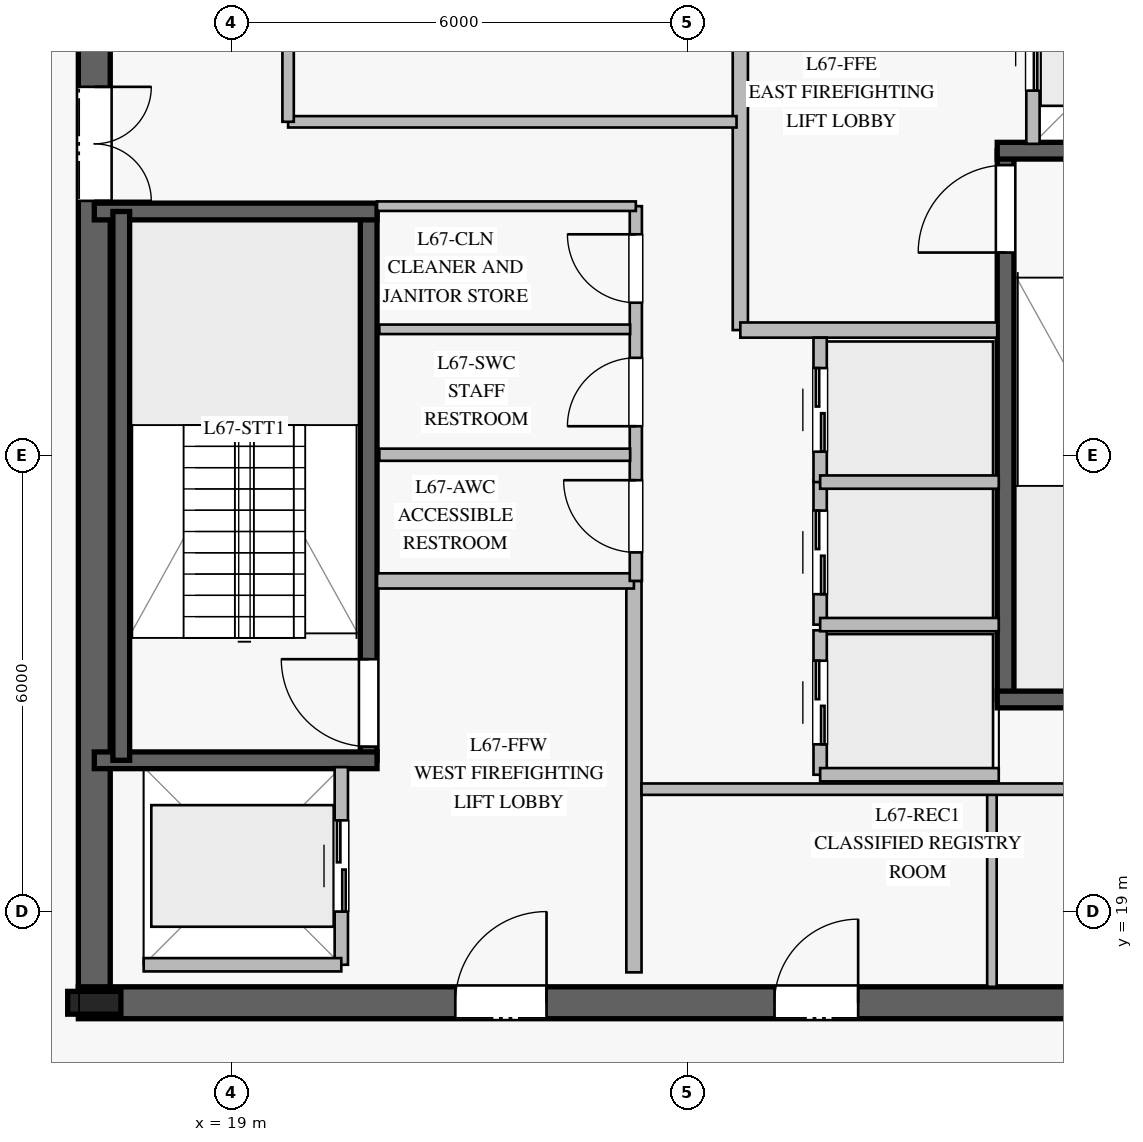
"""IFC4 building model, lengths in metres.
Left out: names, types, materials, properties, quantities, classifications, styles, units other than length and angle.
Written with IfcOpenShell. Run it as: python <this file> out.ifc"""

import sys

from ifc_helpers import new_model, si_unit, direction, frame, frame_2d, origin, origin_2d, place, context, subcontext, project, spatial, rectangle, i_section, extrude, element, fill, save


model = new_model("IFC4")
c1 = context("Model", 3, precision=1e-05, world=origin(), true_north=direction((0.0, 1.0)))
c2 = subcontext(c1, "Body", "Model", "MODEL_VIEW")
j1 = project(units=[si_unit("LENGTHUNIT", "METRE"), si_unit("PLANEANGLEUNIT", "RADIAN")], contexts=[c1])
p1 = place(None, origin())
s1 = spatial("IfcSite", under=j1, at=p1, CompositionType="ELEMENT")
p2 = place(p1, origin())
s2 = spatial("IfcBuilding", under=s1, at=p2, CompositionType="ELEMENT")
p3 = place(p2, frame((0.0, 0.0, 278.2)))
s3 = spatial("IfcBuildingStorey", under=s2, at=p3, CompositionType="ELEMENT", Elevation=278.2)
p4 = place(p3, frame((16.99, 17.8, 0.0), z_axis=(0.0, 0.0, 1.0), x_axis=(1.0, 0.0, 0.0)))
e1 = element("IfcWall", 1, at=p4, inside=s3, PredefinedType="SHEAR", context=c2, shape_type="SweptSolid", body=[
    extrude(rectangle(XDim=16.02, YDim=0.42, at=frame_2d((8.01, 0.0))), origin(), (0.0, 0.0, 1.0), 3.78),
])
p5 = place(p4, frame((4.96, 0.0, 0.0)))
e2 = element("IfcOpeningElement", 2, at=p5, cuts=e1, PredefinedType="OPENING", context=c2, shape_type="SweptSolid", body=[
    extrude(rectangle(XDim=1.2, YDim=2.25, at=frame_2d((0.6, 1.125))), frame((0.0, 0.22, 0.0), z_axis=(0.0, -1.0, 0.0), x_axis=(1.0, 0.0, 0.0)), (0.0, 0.0, 1.0), 0.44),
])
p6 = place(p4, frame((13.91, 0.0, 0.0)))
e3 = element("IfcOpeningElement", 3, at=p6, cuts=e1, PredefinedType="OPENING", context=c2, shape_type="SweptSolid", body=[
    extrude(rectangle(XDim=0.9, YDim=2.1, at=frame_2d((0.45, 1.05))), frame((0.0, 0.22, 0.0), z_axis=(0.0, -1.0, 0.0), x_axis=(1.0, 0.0, 0.0)), (0.0, 0.0, 1.0), 0.44),
])
p7 = place(p4, frame((9.16, 0.0, 0.0)))
e4 = element("IfcOpeningElement", 4, at=p7, cuts=e1, PredefinedType="OPENING", context=c2, shape_type="SweptSolid", body=[
    extrude(rectangle(XDim=1.1, YDim=2.2, at=frame_2d((0.55, 1.1))), frame((0.0, 0.22, 0.0), z_axis=(0.0, -1.0, 0.0), x_axis=(1.0, 0.0, 0.0)), (0.0, 0.0, 1.0), 0.44),
])
p8 = place(p3, frame((17.2, 31.99, 0.0), z_axis=(0.0, 0.0, 1.0), x_axis=(0.0, -1.0, 0.0)))
e5 = element("IfcWall", 5, at=p8, inside=s3, PredefinedType="SHEAR", context=c2, shape_type="SweptSolid", body=[
    extrude(rectangle(XDim=13.98, YDim=0.42, at=frame_2d((6.99, 0.0))), origin(), (0.0, 0.0, 1.0), 3.78),
])
p9 = place(p8, frame((2.14, 0.0, 0.0)))
e6 = element("IfcOpeningElement", 6, at=p9, cuts=e5, PredefinedType="OPENING", context=c2, shape_type="SweptSolid", body=[
    extrude(rectangle(XDim=1.5, YDim=2.2, at=frame_2d((0.75, 1.1))), frame((0.0, 0.22, 0.0), z_axis=(0.0, -1.0, 0.0), x_axis=(1.0, 0.0, 0.0)), (0.0, 0.0, 1.0), 0.44),
])
p10 = place(p3, frame((17.2, 17.8, 0.0), z_axis=(0.0, 0.0, 1.0), x_axis=(1.0, 0.0, 0.0)))
e7 = element("IfcColumn", 7, at=p10, inside=s3, PredefinedType="COLUMN", context=c2, shape_type="SweptSolid", body=[
    extrude(i_section(OverallWidth=0.3, OverallDepth=0.7, WebThickness=0.017, FlangeThickness=0.032, at=origin_2d()), origin(), (0.0, 0.0, 1.0), 4.0),
])
p11 = place(p3, frame((20.81, 20.99, 0.0), z_axis=(0.0, 0.0, 1.0), x_axis=(0.0, 1.0, 0.0)))
e8 = element("IfcWall", 8, at=p11, inside=s3, PredefinedType="SOLIDWALL", context=c2, shape_type="SweptSolid", body=[
    extrude(rectangle(XDim=7.22, YDim=0.22, at=frame_2d((3.61, 0.0))), origin(), (0.0, 0.0, 1.0), 3.78),
])
p12 = place(p11, frame((0.18, 0.0, 0.0)))
e9 = element("IfcOpeningElement", 9, at=p12, cuts=e8, PredefinedType="OPENING", context=c2, shape_type="SweptSolid", body=[
    extrude(rectangle(XDim=1.15, YDim=2.2, at=frame_2d((0.575, 1.1))), frame((0.0, 0.12, 0.0), z_axis=(0.0, -1.0, 0.0), x_axis=(1.0, 0.0, 0.0)), (0.0, 0.0, 1.0), 0.24),
])
for number, where, z_axis, x_axis in (
    (10, (17.2, 20.99, 0.0), (0.0, 0.0, 1.0), (1.0, 0.0, 0.0)),
    (11, (17.2, 28.21, 0.0), (0.0, 0.0, 1.0), (1.0, 0.0, 0.0)),
):
    element("IfcWall", number, at=place(p3, frame(where, z_axis=z_axis, x_axis=x_axis)), inside=s3, PredefinedType="SOLIDWALL", context=c2, shape_type="SweptSolid", body=[
        extrude(rectangle(XDim=3.72, YDim=0.22, at=frame_2d((1.86, 0.0))), origin(), (0.0, 0.0, 1.0), 3.78),
    ])
p13 = place(p3, frame((17.555, 28.21, 0.0), z_axis=(0.0, 0.0, 1.0), x_axis=(0.0, -1.0, 0.0)))
e12 = element("IfcWall", 12, at=p13, inside=s3, PredefinedType="SOLIDWALL", context=c2, shape_type="SweptSolid", body=[
    extrude(rectangle(XDim=7.22, YDim=0.22, at=frame_2d((3.61, 0.0))), origin(), (0.0, 0.0, 1.0), 3.78),
])
p14 = place(p3, frame((29.19, 21.79, 0.0), z_axis=(0.0, 0.0, 1.0), x_axis=(0.0, 1.0, 0.0)))
e13 = element("IfcWall", 13, at=p14, inside=s3, PredefinedType="SOLIDWALL", context=c2, shape_type="SweptSolid", body=[
    extrude(rectangle(XDim=7.22, YDim=0.22, at=frame_2d((3.61, 0.0))), origin(), (0.0, 0.0, 1.0), 3.78),
])
p15 = place(p14, frame((5.88, 0.0, 0.0)))
e14 = element("IfcOpeningElement", 14, at=p15, cuts=e13, PredefinedType="OPENING", context=c2, shape_type="SweptSolid", body=[
    extrude(rectangle(XDim=1.15, YDim=2.2, at=frame_2d((0.575, 1.1))), frame((0.0, 0.12, 0.0), z_axis=(0.0, -1.0, 0.0), x_axis=(1.0, 0.0, 0.0)), (0.0, 0.0, 1.0), 0.24),
])
for number, where, z_axis, x_axis in (
    (15, (29.08, 21.79, 0.0), (0.0, 0.0, 1.0), (1.0, 0.0, 0.0)),
    (16, (29.08, 29.01, 0.0), (0.0, 0.0, 1.0), (1.0, 0.0, 0.0)),
):
    element("IfcWall", number, at=place(p3, frame(where, z_axis=z_axis, x_axis=x_axis)), inside=s3, PredefinedType="SOLIDWALL", context=c2, shape_type="SweptSolid", body=[
        extrude(rectangle(XDim=3.72, YDim=0.22, at=frame_2d((1.86, 0.0))), origin(), (0.0, 0.0, 1.0), 3.78),
    ])
p16 = place(p3, frame((24.3, 18.2, 0.0), z_axis=(0.0, 0.0, 1.0), x_axis=(0.0, 1.0, 0.0)))
e17 = element("IfcWall", 17, at=p16, inside=s3, PredefinedType="PARTITIONING", context=c2, shape_type="SweptSolid", body=[
    extrude(rectangle(XDim=5.15, YDim=0.2, at=frame_2d((2.575, 0.0))), origin(), (0.0, 0.0, 1.0), 3.78),
])
p17 = place(p3, frame((20.92, 23.35, 0.0), z_axis=(0.0, 0.0, 1.0), x_axis=(1.0, 0.0, 0.0)))
e18 = element("IfcWall", 18, at=p17, inside=s3, PredefinedType="PARTITIONING", context=c2, shape_type="SweptSolid", body=[
    extrude(rectangle(XDim=3.38, YDim=0.2, at=frame_2d((1.69, 0.0))), origin(), (0.0, 0.0, 1.0), 3.78),
])
p18 = place(p3, frame((25.7, 26.65, 0.0), z_axis=(0.0, 0.0, 1.0), x_axis=(0.0, 1.0, 0.0)))
e19 = element("IfcWall", 19, at=p18, inside=s3, PredefinedType="PARTITIONING", context=c2, shape_type="SweptSolid", body=[
    extrude(rectangle(XDim=5.15, YDim=0.2, at=frame_2d((2.575, 0.0))), origin(), (0.0, 0.0, 1.0), 3.78),
])
p19 = place(p3, frame((25.7, 26.65, 0.0), z_axis=(0.0, 0.0, 1.0), x_axis=(1.0, 0.0, 0.0)))
e20 = element("IfcWall", 20, at=p19, inside=s3, PredefinedType="PARTITIONING", context=c2, shape_type="SweptSolid", body=[
    extrude(rectangle(XDim=3.38, YDim=0.2, at=frame_2d((1.69, 0.0))), origin(), (0.0, 0.0, 1.0), 3.78),
])
p20 = place(p3, frame((24.325, 23.35, 0.0), z_axis=(0.0, 0.0, 1.0), x_axis=(0.0, 1.0, 0.0)))
e21 = element("IfcWall", 21, at=p20, inside=s3, PredefinedType="PLUMBINGWALL", context=c2, shape_type="SweptSolid", body=[
    extrude(rectangle(XDim=4.93, YDim=0.16, at=frame_2d((2.465, 0.0))), origin(), (0.0, 0.0, 1.0), 3.78),
])
p21 = place(p20, frame((0.375, 0.0, 0.0)))
e22 = element("IfcOpeningElement", 22, at=p21, cuts=e21, PredefinedType="OPENING", context=c2, shape_type="SweptSolid", body=[
    extrude(rectangle(XDim=0.95, YDim=2.1, at=frame_2d((0.475, 1.05))), frame((0.0, 0.09, 0.0), z_axis=(0.0, -1.0, 0.0), x_axis=(1.0, 0.0, 0.0)), (0.0, 0.0, 1.0), 0.18),
])
p22 = place(p20, frame((2.035, 0.0, 0.0)))
e23 = element("IfcOpeningElement", 23, at=p22, cuts=e21, PredefinedType="OPENING", context=c2, shape_type="SweptSolid", body=[
    extrude(rectangle(XDim=0.9, YDim=2.1, at=frame_2d((0.45, 1.05))), frame((0.0, 0.09, 0.0), z_axis=(0.0, -1.0, 0.0), x_axis=(1.0, 0.0, 0.0)), (0.0, 0.0, 1.0), 0.18),
])
p23 = place(p20, frame((3.66, 0.0, 0.0)))
e24 = element("IfcOpeningElement", 24, at=p23, cuts=e21, PredefinedType="OPENING", context=c2, shape_type="SweptSolid", body=[
    extrude(rectangle(XDim=0.9, YDim=2.1, at=frame_2d((0.45, 1.05))), frame((0.0, 0.09, 0.0), z_axis=(0.0, -1.0, 0.0), x_axis=(1.0, 0.0, 0.0)), (0.0, 0.0, 1.0), 0.18),
])
p24 = place(p3, frame((20.92, 28.28, 0.0), z_axis=(0.0, 0.0, 1.0), x_axis=(1.0, 0.0, 0.0)))
e25 = element("IfcWall", 25, at=p24, inside=s3, PredefinedType="PARTITIONING", context=c2, shape_type="SweptSolid", body=[
    extrude(rectangle(XDim=3.405, YDim=0.125, at=frame_2d((1.703, 0.0))), origin(), (0.0, 0.0, 1.0), 3.78),
])
p25 = place(p3, frame((29.01, 18.01, 0.0), z_axis=(0.0, 0.0, 1.0), x_axis=(0.0, 1.0, 0.0)))
e26 = element("IfcWall", 26, at=p25, inside=s3, PredefinedType="PARTITIONING", context=c2, shape_type="SweptSolid", body=[
    extrude(rectangle(XDim=2.54, YDim=0.125, at=frame_2d((1.27, 0.0))), origin(), (0.0, 0.0, 1.0), 3.78),
])
p26 = place(p3, frame((20.95, 25.01, 0.0), z_axis=(0.0, 0.0, 1.0), x_axis=(1.0, 0.0, 0.0)))
e27 = element("IfcWall", 27, at=p26, inside=s3, PredefinedType="PLUMBINGWALL", context=c2, shape_type="SweptSolid", body=[
    extrude(rectangle(XDim=3.3, YDim=0.16, at=frame_2d((1.65, 0.0))), origin(), (0.0, 0.0, 1.0), 3.78),
])
p27 = place(p3, frame((20.95, 26.66, 0.0), z_axis=(0.0, 0.0, 1.0), x_axis=(1.0, 0.0, 0.0)))
e28 = element("IfcWall", 28, at=p27, inside=s3, PredefinedType="PARTITIONING", context=c2, shape_type="SweptSolid", body=[
    extrude(rectangle(XDim=3.3, YDim=0.125, at=frame_2d((1.65, 0.0))), origin(), (0.0, 0.0, 1.0), 3.78),
])
p28 = place(p3, frame((24.4, 20.61, 0.0), z_axis=(0.0, 0.0, 1.0), x_axis=(1.0, 0.0, 0.0)))
e29 = element("IfcWall", 29, at=p28, inside=s3, PredefinedType="PARTITIONING", context=c2, shape_type="SweptSolid", body=[
    extrude(rectangle(XDim=5.9, YDim=0.15, at=frame_2d((2.95, 0.0))), origin(), (0.0, 0.0, 1.0), 3.78),
])
p29 = place(p3, frame((19.75, 29.39, 0.0), z_axis=(0.0, 0.0, 1.0), x_axis=(1.0, 0.0, 0.0)))
e30 = element("IfcWall", 30, at=p29, inside=s3, PredefinedType="PARTITIONING", context=c2, shape_type="SweptSolid", body=[
    extrude(rectangle(XDim=5.9, YDim=0.15, at=frame_2d((2.95, 0.0))), origin(), (0.0, 0.0, 1.0), 3.78),
])
p30 = place(p3, frame((19.75, 29.39, 0.0), z_axis=(0.0, 0.0, 1.0), x_axis=(0.0, 1.0, 0.0)))
e31 = element("IfcWall", 31, at=p30, inside=s3, PredefinedType="PARTITIONING", context=c2, shape_type="SweptSolid", body=[
    extrude(rectangle(XDim=2.41, YDim=0.15, at=frame_2d((1.205, 0.0))), origin(), (0.0, 0.0, 1.0), 3.78),
])
p31 = place(p3, frame((26.75, 20.8, 0.0), z_axis=(0.0, 0.0, 1.0), x_axis=(0.0, 1.0, 0.0)))
e32 = element("IfcWall", 32, at=p31, inside=s3, PredefinedType="PARTITIONING", context=c2, shape_type="SweptSolid", body=[
    extrude(rectangle(XDim=1.9, YDim=0.175, at=frame_2d((0.95, 0.0))), origin(), (0.0, 0.0, 1.0), 3.78),
])
p32 = place(p31, frame((0.4, 0.0, 0.0)))
e33 = element("IfcOpeningElement", 33, at=p32, cuts=e32, PredefinedType="OPENING", context=c2, shape_type="SweptSolid", body=[
    extrude(rectangle(XDim=1.1, YDim=2.2, at=frame_2d((0.55, 1.1))), frame((0.0, 0.098, 0.0), z_axis=(0.0, -1.0, 0.0), x_axis=(1.0, 0.0, 0.0)), (0.0, 0.0, 1.0), 0.195),
])
p33 = place(p3, frame((26.75, 20.8, 0.0), z_axis=(0.0, 0.0, 1.0), x_axis=(1.0, 0.0, 0.0)))
e34 = element("IfcWall", 34, at=p33, inside=s3, PredefinedType="PARTITIONING", context=c2, shape_type="SweptSolid", body=[
    extrude(rectangle(XDim=2.35, YDim=0.175, at=frame_2d((1.175, 0.0))), origin(), (0.0, 0.0, 1.0), 3.78),
])
p34 = place(p3, frame((26.75, 22.775, 0.0), z_axis=(0.0, 0.0, 1.0), x_axis=(0.0, 1.0, 0.0)))
e35 = element("IfcWall", 35, at=p34, inside=s3, PredefinedType="PARTITIONING", context=c2, shape_type="SweptSolid", body=[
    extrude(rectangle(XDim=1.9, YDim=0.175, at=frame_2d((0.95, 0.0))), origin(), (0.0, 0.0, 1.0), 3.78),
])
p35 = place(p34, frame((0.4, 0.0, 0.0)))
e36 = element("IfcOpeningElement", 36, at=p35, cuts=e35, PredefinedType="OPENING", context=c2, shape_type="SweptSolid", body=[
    extrude(rectangle(XDim=1.1, YDim=2.2, at=frame_2d((0.55, 1.1))), frame((0.0, 0.098, 0.0), z_axis=(0.0, -1.0, 0.0), x_axis=(1.0, 0.0, 0.0)), (0.0, 0.0, 1.0), 0.195),
])
p36 = place(p3, frame((26.75, 22.775, 0.0), z_axis=(0.0, 0.0, 1.0), x_axis=(1.0, 0.0, 0.0)))
e37 = element("IfcWall", 37, at=p36, inside=s3, PredefinedType="PARTITIONING", context=c2, shape_type="SweptSolid", body=[
    extrude(rectangle(XDim=2.35, YDim=0.175, at=frame_2d((1.175, 0.0))), origin(), (0.0, 0.0, 1.0), 3.78),
])
p37 = place(p3, frame((26.75, 24.65, 0.0), z_axis=(0.0, 0.0, 1.0), x_axis=(0.0, 1.0, 0.0)))
e38 = element("IfcWall", 38, at=p37, inside=s3, PredefinedType="PARTITIONING", context=c2, shape_type="SweptSolid", body=[
    extrude(rectangle(XDim=1.9, YDim=0.175, at=frame_2d((0.95, 0.0))), origin(), (0.0, 0.0, 1.0), 3.78),
])
p38 = place(p37, frame((0.4, 0.0, 0.0)))
e39 = element("IfcOpeningElement", 39, at=p38, cuts=e38, PredefinedType="OPENING", context=c2, shape_type="SweptSolid", body=[
    extrude(rectangle(XDim=1.1, YDim=2.2, at=frame_2d((0.55, 1.1))), frame((0.0, 0.098, 0.0), z_axis=(0.0, -1.0, 0.0), x_axis=(1.0, 0.0, 0.0)), (0.0, 0.0, 1.0), 0.195),
])
p39 = place(p3, frame((26.75, 24.65, 0.0), z_axis=(0.0, 0.0, 1.0), x_axis=(1.0, 0.0, 0.0)))
e40 = element("IfcWall", 40, at=p39, inside=s3, PredefinedType="PARTITIONING", context=c2, shape_type="SweptSolid", body=[
    extrude(rectangle(XDim=2.35, YDim=0.175, at=frame_2d((1.175, 0.0))), origin(), (0.0, 0.0, 1.0), 3.78),
])
p40 = place(p3, frame((20.45, 18.3, 0.0), z_axis=(0.0, 0.0, 1.0), x_axis=(0.0, 1.0, 0.0)))
e41 = element("IfcWall", 41, at=p40, inside=s3, PredefinedType="PARTITIONING", context=c2, shape_type="SweptSolid", body=[
    extrude(rectangle(XDim=2.6, YDim=0.175, at=frame_2d((1.3, 0.0))), origin(), (0.0, 0.0, 1.0), 3.78),
])
p41 = place(p40, frame((0.7, 0.0, 0.0)))
e42 = element("IfcOpeningElement", 42, at=p41, cuts=e41, PredefinedType="OPENING", context=c2, shape_type="SweptSolid", body=[
    extrude(rectangle(XDim=1.2, YDim=2.2, at=frame_2d((0.6, 1.1))), frame((0.0, 0.098, 0.0), z_axis=(0.0, -1.0, 0.0), x_axis=(1.0, 0.0, 0.0)), (0.0, 0.0, 1.0), 0.195),
])
p42 = place(p3, frame((17.85, 18.3, 0.0), z_axis=(0.0, 0.0, 1.0), x_axis=(1.0, 0.0, 0.0)))
e43 = element("IfcWall", 43, at=p42, inside=s3, PredefinedType="PARTITIONING", context=c2, shape_type="SweptSolid", body=[
    extrude(rectangle(XDim=2.6, YDim=0.175, at=frame_2d((1.3, 0.0))), origin(), (0.0, 0.0, 1.0), 3.78),
])
p43 = place(p3, frame((29.55, 29.1, 0.0), z_axis=(0.0, 0.0, 1.0), x_axis=(0.0, 1.0, 0.0)))
e44 = element("IfcWall", 44, at=p43, inside=s3, PredefinedType="PARTITIONING", context=c2, shape_type="SweptSolid", body=[
    extrude(rectangle(XDim=2.6, YDim=0.175, at=frame_2d((1.3, 0.0))), origin(), (0.0, 0.0, 1.0), 3.78),
])
p44 = place(p43, frame((0.7, 0.0, 0.0)))
e45 = element("IfcOpeningElement", 45, at=p44, cuts=e44, PredefinedType="OPENING", context=c2, shape_type="SweptSolid", body=[
    extrude(rectangle(XDim=1.2, YDim=2.2, at=frame_2d((0.6, 1.1))), frame((0.0, 0.098, 0.0), z_axis=(0.0, -1.0, 0.0), x_axis=(1.0, 0.0, 0.0)), (0.0, 0.0, 1.0), 0.195),
])
p45 = place(p12, origin())
e46 = element("IfcDoor", 46, at=p45, inside=s3, OperationType="SINGLE_SWING_RIGHT", PredefinedType="DOOR", context=c2, shape_type="SweptSolid", body=[
    extrude(rectangle(XDim=1.15, YDim=2.2, at=frame_2d((0.575, 1.1))), frame((0.0, 0.025, 0.0), z_axis=(0.0, -1.0, 0.0), x_axis=(1.0, 0.0, 0.0)), (0.0, 0.0, 1.0), 0.05),
])
fill(e9, e46)
p46 = place(p15, origin())
e47 = element("IfcDoor", 47, at=p46, inside=s3, OperationType="SINGLE_SWING_LEFT", PredefinedType="DOOR", context=c2, shape_type="SweptSolid", body=[
    extrude(rectangle(XDim=1.15, YDim=2.2, at=frame_2d((0.575, 1.1))), frame((0.0, 0.025, 0.0), z_axis=(0.0, -1.0, 0.0), x_axis=(1.0, 0.0, 0.0)), (0.0, 0.0, 1.0), 0.05),
])
fill(e14, e47)
p47 = place(p5, origin())
e48 = element("IfcDoor", 48, at=p47, inside=s3, OperationType="SINGLE_SWING_RIGHT", PredefinedType="DOOR", context=c2, shape_type="SweptSolid", body=[
    extrude(rectangle(XDim=1.2, YDim=2.25, at=frame_2d((0.6, 1.125))), frame((0.0, 0.025, 0.0), z_axis=(0.0, -1.0, 0.0), x_axis=(1.0, 0.0, 0.0)), (0.0, 0.0, 1.0), 0.05),
])
fill(e2, e48)
p48 = place(p9, origin())
e49 = element("IfcDoor", 49, at=p48, inside=s3, OperationType="DOUBLE_DOOR_SINGLE_SWING", PredefinedType="DOOR", context=c2, shape_type="SweptSolid", body=[
    extrude(rectangle(XDim=1.5, YDim=2.2, at=frame_2d((0.75, 1.1))), frame((0.0, 0.025, 0.0), z_axis=(0.0, -1.0, 0.0), x_axis=(1.0, 0.0, 0.0)), (0.0, 0.0, 1.0), 0.05),
])
fill(e6, e49)
p49 = place(p21, origin())
e50 = element("IfcDoor", 50, at=p49, inside=s3, OperationType="SINGLE_SWING_RIGHT", PredefinedType="DOOR", context=c2, shape_type="SweptSolid", body=[
    extrude(rectangle(XDim=0.95, YDim=2.1, at=frame_2d((0.475, 1.05))), frame((0.0, 0.025, 0.0), z_axis=(0.0, -1.0, 0.0), x_axis=(1.0, 0.0, 0.0)), (0.0, 0.0, 1.0), 0.05),
])
fill(e22, e50)
p50 = place(p22, origin())
e51 = element("IfcDoor", 51, at=p50, inside=s3, OperationType="SINGLE_SWING_LEFT", PredefinedType="DOOR", context=c2, shape_type="SweptSolid", body=[
    extrude(rectangle(XDim=0.9, YDim=2.1, at=frame_2d((0.45, 1.05))), frame((0.0, 0.025, 0.0), z_axis=(0.0, -1.0, 0.0), x_axis=(1.0, 0.0, 0.0)), (0.0, 0.0, 1.0), 0.05),
])
fill(e23, e51)
p51 = place(p23, origin())
e52 = element("IfcDoor", 52, at=p51, inside=s3, OperationType="SINGLE_SWING_RIGHT", PredefinedType="DOOR", context=c2, shape_type="SweptSolid", body=[
    extrude(rectangle(XDim=0.9, YDim=2.1, at=frame_2d((0.45, 1.05))), frame((0.0, 0.025, 0.0), z_axis=(0.0, -1.0, 0.0), x_axis=(1.0, 0.0, 0.0)), (0.0, 0.0, 1.0), 0.05),
])
fill(e24, e52)
p52 = place(p7, origin())
e53 = element("IfcDoor", 53, at=p52, inside=s3, OperationType="SINGLE_SWING_RIGHT", PredefinedType="DOOR", context=c2, shape_type="SweptSolid", body=[
    extrude(rectangle(XDim=1.1, YDim=2.2, at=frame_2d((0.55, 1.1))), frame((0.0, 0.025, 0.0), z_axis=(0.0, -1.0, 0.0), x_axis=(1.0, 0.0, 0.0)), (0.0, 0.0, 1.0), 0.05),
])
fill(e4, e53)
p53 = place(p32, origin())
e54 = element("IfcDoor", 54, at=p53, inside=s3, OperationType="DOUBLE_DOOR_SLIDING", PredefinedType="DOOR", context=c2, shape_type="SweptSolid", body=[
    extrude(rectangle(XDim=1.1, YDim=2.2, at=frame_2d((0.55, 1.1))), frame((0.0, 0.025, 0.0), z_axis=(0.0, -1.0, 0.0), x_axis=(1.0, 0.0, 0.0)), (0.0, 0.0, 1.0), 0.05),
])
fill(e33, e54)
p54 = place(p35, origin())
e55 = element("IfcDoor", 55, at=p54, inside=s3, OperationType="DOUBLE_DOOR_SLIDING", PredefinedType="DOOR", context=c2, shape_type="SweptSolid", body=[
    extrude(rectangle(XDim=1.1, YDim=2.2, at=frame_2d((0.55, 1.1))), frame((0.0, 0.025, 0.0), z_axis=(0.0, -1.0, 0.0), x_axis=(1.0, 0.0, 0.0)), (0.0, 0.0, 1.0), 0.05),
])
fill(e36, e55)
p55 = place(p38, origin())
e56 = element("IfcDoor", 56, at=p55, inside=s3, OperationType="DOUBLE_DOOR_SLIDING", PredefinedType="DOOR", context=c2, shape_type="SweptSolid", body=[
    extrude(rectangle(XDim=1.1, YDim=2.2, at=frame_2d((0.55, 1.1))), frame((0.0, 0.025, 0.0), z_axis=(0.0, -1.0, 0.0), x_axis=(1.0, 0.0, 0.0)), (0.0, 0.0, 1.0), 0.05),
])
fill(e39, e56)
p56 = place(p41, origin())
e57 = element("IfcDoor", 57, at=p56, inside=s3, OperationType="DOUBLE_DOOR_SLIDING", PredefinedType="DOOR", context=c2, shape_type="SweptSolid", body=[
    extrude(rectangle(XDim=1.2, YDim=2.2, at=frame_2d((0.6, 1.1))), frame((0.0, 0.025, 0.0), z_axis=(0.0, -1.0, 0.0), x_axis=(1.0, 0.0, 0.0)), (0.0, 0.0, 1.0), 0.05),
])
fill(e42, e57)
p57 = place(p44, origin())
e58 = element("IfcDoor", 58, at=p57, inside=s3, OperationType="DOUBLE_DOOR_SLIDING", PredefinedType="DOOR", context=c2, shape_type="SweptSolid", body=[
    extrude(rectangle(XDim=1.2, YDim=2.2, at=frame_2d((0.6, 1.1))), frame((0.0, 0.025, 0.0), z_axis=(0.0, -1.0, 0.0), x_axis=(1.0, 0.0, 0.0)), (0.0, 0.0, 1.0), 0.05),
])
fill(e45, e58)
save(model, sys.argv[1])
